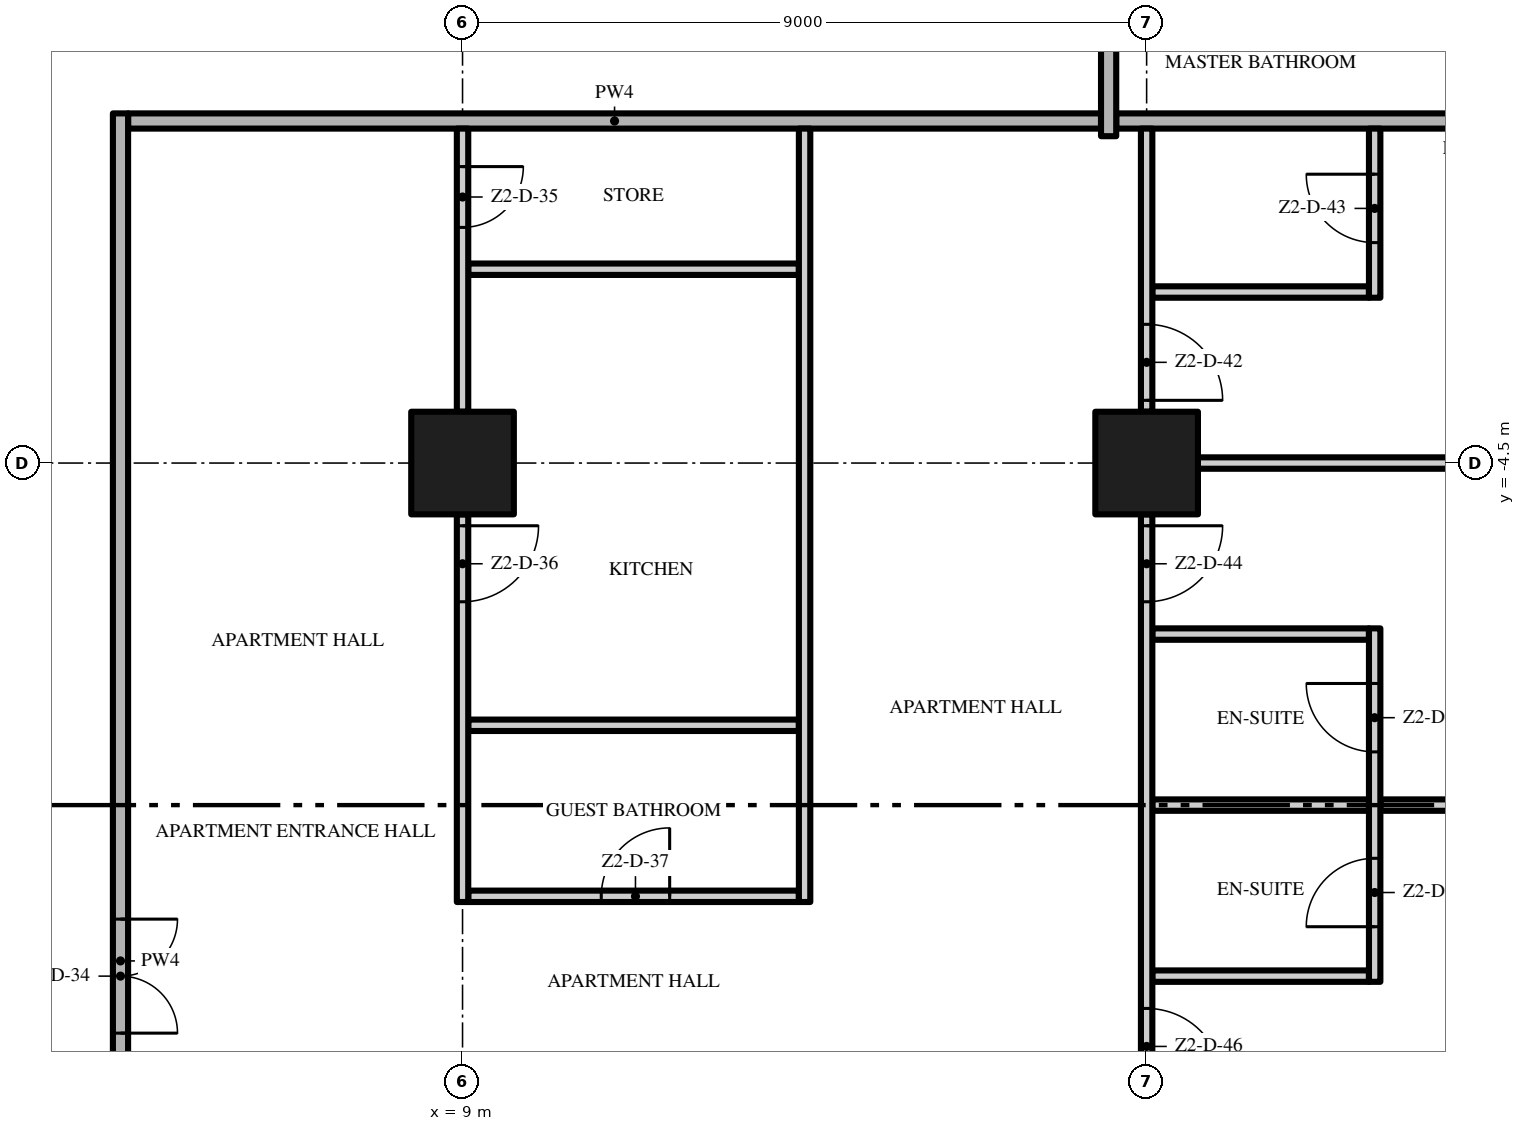
"""IFC4 building model, lengths in metres.
Left out: names, types, materials, properties, quantities, classifications, styles, units other than length and angle.
Written with IfcOpenShell. Run it as: python <this file> out.ifc"""

import sys

from ifc_helpers import new_model, si_unit, direction, frame, frame_2d, origin, origin_2d, place, context, subcontext, project, spatial, rectangle, extrude, element, fill, save


model = new_model("IFC4")
c1 = context("Model", 3, precision=1e-05, world=origin(), true_north=direction((0.0, 1.0)))
c2 = subcontext(c1, "Body", "Model", "MODEL_VIEW")
j1 = project(units=[si_unit("LENGTHUNIT", "METRE"), si_unit("PLANEANGLEUNIT", "RADIAN")], contexts=[c1])
p1 = place(None, origin())
s1 = spatial("IfcSite", under=j1, at=p1, CompositionType="ELEMENT")
p2 = place(p1, origin())
s2 = spatial("IfcBuilding", under=s1, at=p2, CompositionType="ELEMENT")
p3 = place(p2, frame((0.0, 0.0, 111.2)))
s3 = spatial("IfcBuildingStorey", under=s2, at=p3, CompositionType="ELEMENT", Elevation=111.2)
for number, where, z_axis, x_axis in (
    (1, (18.0, -4.5, 0.0), (0.0, 0.0, 1.0), (1.0, 0.0, 0.0)),
    (2, (9.0, -4.5, 0.0), (0.0, 0.0, 1.0), (1.0, 0.0, 0.0)),
):
    element("IfcColumn", number, at=place(p3, frame(where, z_axis=z_axis, x_axis=x_axis)), inside=s3, PredefinedType="COLUMN", context=c2, shape_type="SweptSolid", body=[
        extrude(rectangle(XDim=1.35, YDim=1.35, at=origin_2d()), origin(), (0.0, 0.0, 1.0), 3.5),
    ])
p4 = place(p3, frame((18.075, -11.25, 0.0), z_axis=(0.0, 0.0, 1.0), x_axis=(1.0, 0.0, 0.0)))
e3 = element("IfcWall", 3, at=p4, inside=s3, PredefinedType="PARTITIONING", context=c2, shape_type="SweptSolid", body=[
    extrude(rectangle(XDim=2.85, YDim=0.15, at=frame_2d((1.425, 0.0))), origin(), (0.0, 0.0, 1.0), 3.5),
])
p5 = place(p3, frame((9.075, -10.2, 0.0), z_axis=(0.0, 0.0, 1.0), x_axis=(1.0, 0.0, 0.0)))
e4 = element("IfcWall", 4, at=p5, inside=s3, PredefinedType="PARTITIONING", context=c2, shape_type="SweptSolid", body=[
    extrude(rectangle(XDim=4.35, YDim=0.15, at=frame_2d((2.175, 0.0))), origin(), (0.0, 0.0, 1.0), 3.5),
])
p6 = place(p5, frame((1.75, 0.0, 0.0)))
e5 = element("IfcOpeningElement", 5, at=p6, cuts=e4, PredefinedType="OPENING", context=c2, shape_type="SweptSolid", body=[
    extrude(rectangle(XDim=0.9, YDim=2.1, at=frame_2d((0.45, 1.05))), frame((0.0, 0.085, 0.0), z_axis=(0.0, -1.0, 0.0), x_axis=(1.0, 0.0, 0.0)), (0.0, 0.0, 1.0), 0.17),
])
p7 = place(p3, frame((18.075, -9.0, 0.0), z_axis=(0.0, 0.0, 1.0), x_axis=(1.0, 0.0, 0.0)))
e6 = element("IfcWall", 6, at=p7, inside=s3, PredefinedType="PARTITIONING", context=c2, shape_type="SweptSolid", body=[
    extrude(rectangle(XDim=2.85, YDim=0.15, at=frame_2d((1.425, 0.0))), origin(), (0.0, 0.0, 1.0), 3.5),
])
p8 = place(p3, frame((21.075, -9.0, 0.0), z_axis=(0.0, 0.0, 1.0), x_axis=(1.0, 0.0, 0.0)))
e7 = element("IfcWall", 7, at=p8, inside=s3, PredefinedType="PARTITIONING", context=c2, shape_type="SweptSolid", body=[
    extrude(rectangle(XDim=5.625, YDim=0.15, at=frame_2d((2.812, 0.0))), origin(), (0.0, 0.0, 1.0), 3.5),
])
p9 = place(p3, frame((9.075, -7.95, 0.0), z_axis=(0.0, 0.0, 1.0), x_axis=(1.0, 0.0, 0.0)))
e8 = element("IfcWall", 8, at=p9, inside=s3, PredefinedType="PARTITIONING", context=c2, shape_type="SweptSolid", body=[
    extrude(rectangle(XDim=4.35, YDim=0.15, at=frame_2d((2.175, 0.0))), origin(), (0.0, 0.0, 1.0), 3.5),
])
p10 = place(p3, frame((18.075, -6.75, 0.0), z_axis=(0.0, 0.0, 1.0), x_axis=(1.0, 0.0, 0.0)))
e9 = element("IfcWall", 9, at=p10, inside=s3, PredefinedType="PARTITIONING", context=c2, shape_type="SweptSolid", body=[
    extrude(rectangle(XDim=2.85, YDim=0.15, at=frame_2d((1.425, 0.0))), origin(), (0.0, 0.0, 1.0), 3.5),
])
p11 = place(p3, frame((18.675, -4.5, 0.0), z_axis=(0.0, 0.0, 1.0), x_axis=(1.0, 0.0, 0.0)))
e10 = element("IfcWall", 10, at=p11, inside=s3, PredefinedType="PARTITIONING", context=c2, shape_type="SweptSolid", body=[
    extrude(rectangle(XDim=7.075, YDim=0.15, at=frame_2d((3.538, 0.0))), origin(), (0.0, 0.0, 1.0), 3.5),
])
p12 = place(p3, frame((18.075, -2.25, 0.0), z_axis=(0.0, 0.0, 1.0), x_axis=(1.0, 0.0, 0.0)))
e11 = element("IfcWall", 11, at=p12, inside=s3, PredefinedType="PARTITIONING", context=c2, shape_type="SweptSolid", body=[
    extrude(rectangle(XDim=2.85, YDim=0.15, at=frame_2d((1.425, 0.0))), origin(), (0.0, 0.0, 1.0), 3.5),
])
p13 = place(p3, frame((9.075, -1.95, 0.0), z_axis=(0.0, 0.0, 1.0), x_axis=(1.0, 0.0, 0.0)))
e12 = element("IfcWall", 12, at=p13, inside=s3, PredefinedType="PARTITIONING", context=c2, shape_type="SweptSolid", body=[
    extrude(rectangle(XDim=4.35, YDim=0.15, at=frame_2d((2.175, 0.0))), origin(), (0.0, 0.0, 1.0), 3.5),
])
p14 = place(p3, frame((4.6, 0.0, 0.0), z_axis=(0.0, 0.0, 1.0), x_axis=(1.0, 0.0, 0.0)))
e13 = element("IfcWall", 13, at=p14, inside=s3, PredefinedType="PARTITIONING", context=c2, shape_type="SweptSolid", body=[
    extrude(rectangle(XDim=12.8, YDim=0.2, at=frame_2d((6.4, 0.0))), origin(), (0.0, 0.0, 1.0), 3.5),
])
p15 = place(p3, frame((17.6, 0.0, 0.0), z_axis=(0.0, 0.0, 1.0), x_axis=(1.0, 0.0, 0.0)))
e14 = element("IfcWall", 14, at=p15, inside=s3, PredefinedType="PARTITIONING", context=c2, shape_type="SweptSolid", body=[
    extrude(rectangle(XDim=9.1, YDim=0.2, at=frame_2d((4.55, 0.0))), origin(), (0.0, 0.0, 1.0), 3.5),
])
p16 = place(p3, frame((4.5, 0.1, 0.0), z_axis=(0.0, 0.0, 1.0), x_axis=(0.0, -1.0, 0.0)))
e15 = element("IfcWall", 15, at=p16, inside=s3, PredefinedType="PARTITIONING", context=c2, shape_type="SweptSolid", body=[
    extrude(rectangle(XDim=22.3, YDim=0.2, at=frame_2d((11.15, 0.0))), origin(), (0.0, 0.0, 1.0), 3.5),
])
p17 = place(p16, frame((10.6, 0.0, 0.0)))
e16 = element("IfcOpeningElement", 16, at=p17, cuts=e15, PredefinedType="OPENING", context=c2, shape_type="SweptSolid", body=[
    extrude(rectangle(XDim=1.5, YDim=2.4, at=frame_2d((0.75, 1.2))), frame((0.0, 0.11, 0.0), z_axis=(0.0, -1.0, 0.0), x_axis=(1.0, 0.0, 0.0)), (0.0, 0.0, 1.0), 0.22),
])
p18 = place(p3, frame((9.0, -5.175, 0.0), z_axis=(0.0, 0.0, 1.0), x_axis=(0.0, -1.0, 0.0)))
e17 = element("IfcWall", 17, at=p18, inside=s3, PredefinedType="PARTITIONING", context=c2, shape_type="SweptSolid", body=[
    extrude(rectangle(XDim=5.1, YDim=0.15, at=frame_2d((2.55, 0.0))), origin(), (0.0, 0.0, 1.0), 3.5),
])
p19 = place(p18, frame((0.15, 0.0, 0.0)))
e18 = element("IfcOpeningElement", 18, at=p19, cuts=e17, PredefinedType="OPENING", context=c2, shape_type="SweptSolid", body=[
    extrude(rectangle(XDim=1.0, YDim=2.4, at=frame_2d((0.5, 1.2))), frame((0.0, 0.085, 0.0), z_axis=(0.0, -1.0, 0.0), x_axis=(1.0, 0.0, 0.0)), (0.0, 0.0, 1.0), 0.17),
])
p20 = place(p3, frame((9.0, -0.1, 0.0), z_axis=(0.0, 0.0, 1.0), x_axis=(0.0, -1.0, 0.0)))
e19 = element("IfcWall", 19, at=p20, inside=s3, PredefinedType="PARTITIONING", context=c2, shape_type="SweptSolid", body=[
    extrude(rectangle(XDim=3.725, YDim=0.15, at=frame_2d((1.863, 0.0))), origin(), (0.0, 0.0, 1.0), 3.5),
])
p21 = place(p20, frame((0.5, 0.0, 0.0)))
e20 = element("IfcOpeningElement", 20, at=p21, cuts=e19, PredefinedType="OPENING", context=c2, shape_type="SweptSolid", body=[
    extrude(rectangle(XDim=0.8, YDim=2.0, at=frame_2d((0.4, 1.0))), frame((0.0, 0.085, 0.0), z_axis=(0.0, -1.0, 0.0), x_axis=(1.0, 0.0, 0.0)), (0.0, 0.0, 1.0), 0.17),
])
p22 = place(p3, frame((13.5, -10.275, 0.0), z_axis=(0.0, 0.0, 1.0), x_axis=(0.0, 1.0, 0.0)))
e21 = element("IfcWall", 21, at=p22, inside=s3, PredefinedType="PARTITIONING", context=c2, shape_type="SweptSolid", body=[
    extrude(rectangle(XDim=10.175, YDim=0.15, at=frame_2d((5.088, 0.0))), origin(), (0.0, 0.0, 1.0), 3.5),
])
p23 = place(p3, frame((17.5, -0.2, 0.0), z_axis=(0.0, 0.0, 1.0), x_axis=(0.0, 1.0, 0.0)))
e22 = element("IfcWall", 22, at=p23, inside=s3, PredefinedType="PARTITIONING", context=c2, shape_type="SweptSolid", body=[
    extrude(rectangle(XDim=4.025, YDim=0.2, at=frame_2d((2.013, 0.0))), origin(), (0.0, 0.0, 1.0), 3.5),
])
p24 = place(p3, frame((18.0, -5.175, 0.0), z_axis=(0.0, 0.0, 1.0), x_axis=(0.0, -1.0, 0.0)))
e23 = element("IfcWall", 23, at=p24, inside=s3, PredefinedType="PARTITIONING", context=c2, shape_type="SweptSolid", body=[
    extrude(rectangle(XDim=7.65, YDim=0.15, at=frame_2d((3.825, 0.0))), origin(), (0.0, 0.0, 1.0), 3.5),
])
p25 = place(p24, frame((0.15, 0.0, 0.0)))
e24 = element("IfcOpeningElement", 24, at=p25, cuts=e23, PredefinedType="OPENING", context=c2, shape_type="SweptSolid", body=[
    extrude(rectangle(XDim=1.0, YDim=2.4, at=frame_2d((0.5, 1.2))), frame((0.0, 0.085, 0.0), z_axis=(0.0, -1.0, 0.0), x_axis=(1.0, 0.0, 0.0)), (0.0, 0.0, 1.0), 0.17),
])
p26 = place(p24, frame((6.5, 0.0, 0.0)))
e25 = element("IfcOpeningElement", 25, at=p26, cuts=e23, PredefinedType="OPENING", context=c2, shape_type="SweptSolid", body=[
    extrude(rectangle(XDim=1.0, YDim=2.4, at=frame_2d((0.5, 1.2))), frame((0.0, 0.085, 0.0), z_axis=(0.0, -1.0, 0.0), x_axis=(1.0, 0.0, 0.0)), (0.0, 0.0, 1.0), 0.17),
])
p27 = place(p3, frame((18.0, -0.1, 0.0), z_axis=(0.0, 0.0, 1.0), x_axis=(0.0, -1.0, 0.0)))
e26 = element("IfcWall", 26, at=p27, inside=s3, PredefinedType="PARTITIONING", context=c2, shape_type="SweptSolid", body=[
    extrude(rectangle(XDim=3.725, YDim=0.15, at=frame_2d((1.863, 0.0))), origin(), (0.0, 0.0, 1.0), 3.5),
])
p28 = place(p27, frame((2.575, 0.0, 0.0)))
e27 = element("IfcOpeningElement", 27, at=p28, cuts=e26, PredefinedType="OPENING", context=c2, shape_type="SweptSolid", body=[
    extrude(rectangle(XDim=1.0, YDim=2.4, at=frame_2d((0.5, 1.2))), frame((0.0, 0.085, 0.0), z_axis=(0.0, -1.0, 0.0), x_axis=(1.0, 0.0, 0.0)), (0.0, 0.0, 1.0), 0.17),
])
p29 = place(p3, frame((21.0, -11.325, 0.0), z_axis=(0.0, 0.0, 1.0), x_axis=(0.0, 1.0, 0.0)))
e28 = element("IfcWall", 28, at=p29, inside=s3, PredefinedType="PARTITIONING", context=c2, shape_type="SweptSolid", body=[
    extrude(rectangle(XDim=4.65, YDim=0.15, at=frame_2d((2.325, 0.0))), origin(), (0.0, 0.0, 1.0), 3.5),
])
p30 = place(p29, frame((3.025, 0.0, 0.0)))
e29 = element("IfcOpeningElement", 29, at=p30, cuts=e28, PredefinedType="OPENING", context=c2, shape_type="SweptSolid", body=[
    extrude(rectangle(XDim=0.9, YDim=2.1, at=frame_2d((0.45, 1.05))), frame((0.0, 0.085, 0.0), z_axis=(0.0, -1.0, 0.0), x_axis=(1.0, 0.0, 0.0)), (0.0, 0.0, 1.0), 0.17),
])
p31 = place(p29, frame((0.725, 0.0, 0.0)))
e30 = element("IfcOpeningElement", 30, at=p31, cuts=e28, PredefinedType="OPENING", context=c2, shape_type="SweptSolid", body=[
    extrude(rectangle(XDim=0.9, YDim=2.1, at=frame_2d((0.45, 1.05))), frame((0.0, 0.085, 0.0), z_axis=(0.0, -1.0, 0.0), x_axis=(1.0, 0.0, 0.0)), (0.0, 0.0, 1.0), 0.17),
])
p32 = place(p3, frame((21.0, -2.325, 0.0), z_axis=(0.0, 0.0, 1.0), x_axis=(0.0, 1.0, 0.0)))
e31 = element("IfcWall", 31, at=p32, inside=s3, PredefinedType="PARTITIONING", context=c2, shape_type="SweptSolid", body=[
    extrude(rectangle(XDim=2.225, YDim=0.15, at=frame_2d((1.113, 0.0))), origin(), (0.0, 0.0, 1.0), 3.5),
])
p33 = place(p32, frame((0.725, 0.0, 0.0)))
e32 = element("IfcOpeningElement", 32, at=p33, cuts=e31, PredefinedType="OPENING", context=c2, shape_type="SweptSolid", body=[
    extrude(rectangle(XDim=0.9, YDim=2.1, at=frame_2d((0.45, 1.05))), frame((0.0, 0.085, 0.0), z_axis=(0.0, -1.0, 0.0), x_axis=(1.0, 0.0, 0.0)), (0.0, 0.0, 1.0), 0.17),
])
p34 = place(p17, origin())
e33 = element("IfcDoor", 33, at=p34, inside=s3, OperationType="DOUBLE_DOOR_SINGLE_SWING", PredefinedType="DOOR", context=c2, shape_type="SweptSolid", body=[
    extrude(rectangle(XDim=1.5, YDim=2.4, at=frame_2d((0.75, 1.2))), frame((0.0, 0.025, 0.0), z_axis=(0.0, -1.0, 0.0), x_axis=(1.0, 0.0, 0.0)), (0.0, 0.0, 1.0), 0.05),
])
fill(e16, e33)
p35 = place(p21, origin())
e34 = element("IfcDoor", 34, at=p35, inside=s3, OperationType="SINGLE_SWING_LEFT", PredefinedType="DOOR", context=c2, shape_type="SweptSolid", body=[
    extrude(rectangle(XDim=0.8, YDim=2.0, at=frame_2d((0.4, 1.0))), frame((0.0, 0.025, 0.0), z_axis=(0.0, -1.0, 0.0), x_axis=(1.0, 0.0, 0.0)), (0.0, 0.0, 1.0), 0.05),
])
fill(e20, e34)
p36 = place(p19, origin())
e35 = element("IfcDoor", 35, at=p36, inside=s3, OperationType="SINGLE_SWING_LEFT", PredefinedType="DOOR", context=c2, shape_type="SweptSolid", body=[
    extrude(rectangle(XDim=1.0, YDim=2.4, at=frame_2d((0.5, 1.2))), frame((0.0, 0.025, 0.0), z_axis=(0.0, -1.0, 0.0), x_axis=(1.0, 0.0, 0.0)), (0.0, 0.0, 1.0), 0.05),
])
fill(e18, e35)
p37 = place(p6, origin())
e36 = element("IfcDoor", 36, at=p37, inside=s3, OperationType="SINGLE_SWING_RIGHT", PredefinedType="DOOR", context=c2, shape_type="SweptSolid", body=[
    extrude(rectangle(XDim=0.9, YDim=2.1, at=frame_2d((0.45, 1.05))), frame((0.0, 0.025, 0.0), z_axis=(0.0, -1.0, 0.0), x_axis=(1.0, 0.0, 0.0)), (0.0, 0.0, 1.0), 0.05),
])
fill(e5, e36)
p38 = place(p28, origin())
e37 = element("IfcDoor", 37, at=p38, inside=s3, OperationType="SINGLE_SWING_RIGHT", PredefinedType="DOOR", context=c2, shape_type="SweptSolid", body=[
    extrude(rectangle(XDim=1.0, YDim=2.4, at=frame_2d((0.5, 1.2))), frame((0.0, 0.025, 0.0), z_axis=(0.0, -1.0, 0.0), x_axis=(1.0, 0.0, 0.0)), (0.0, 0.0, 1.0), 0.05),
])
fill(e27, e37)
p39 = place(p33, origin())
e38 = element("IfcDoor", 38, at=p39, inside=s3, OperationType="SINGLE_SWING_RIGHT", PredefinedType="DOOR", context=c2, shape_type="SweptSolid", body=[
    extrude(rectangle(XDim=0.9, YDim=2.1, at=frame_2d((0.45, 1.05))), frame((0.0, 0.025, 0.0), z_axis=(0.0, -1.0, 0.0), x_axis=(1.0, 0.0, 0.0)), (0.0, 0.0, 1.0), 0.05),
])
fill(e32, e38)
p40 = place(p25, origin())
e39 = element("IfcDoor", 39, at=p40, inside=s3, OperationType="SINGLE_SWING_LEFT", PredefinedType="DOOR", context=c2, shape_type="SweptSolid", body=[
    extrude(rectangle(XDim=1.0, YDim=2.4, at=frame_2d((0.5, 1.2))), frame((0.0, 0.025, 0.0), z_axis=(0.0, -1.0, 0.0), x_axis=(1.0, 0.0, 0.0)), (0.0, 0.0, 1.0), 0.05),
])
fill(e24, e39)
p41 = place(p30, origin())
e40 = element("IfcDoor", 40, at=p41, inside=s3, OperationType="SINGLE_SWING_RIGHT", PredefinedType="DOOR", context=c2, shape_type="SweptSolid", body=[
    extrude(rectangle(XDim=0.9, YDim=2.1, at=frame_2d((0.45, 1.05))), frame((0.0, 0.025, 0.0), z_axis=(0.0, -1.0, 0.0), x_axis=(1.0, 0.0, 0.0)), (0.0, 0.0, 1.0), 0.05),
])
fill(e29, e40)
p42 = place(p26, origin())
e41 = element("IfcDoor", 41, at=p42, inside=s3, OperationType="SINGLE_SWING_RIGHT", PredefinedType="DOOR", context=c2, shape_type="SweptSolid", body=[
    extrude(rectangle(XDim=1.0, YDim=2.4, at=frame_2d((0.5, 1.2))), frame((0.0, 0.025, 0.0), z_axis=(0.0, -1.0, 0.0), x_axis=(1.0, 0.0, 0.0)), (0.0, 0.0, 1.0), 0.05),
])
fill(e25, e41)
p43 = place(p31, origin())
e42 = element("IfcDoor", 42, at=p43, inside=s3, OperationType="SINGLE_SWING_LEFT", PredefinedType="DOOR", context=c2, shape_type="SweptSolid", body=[
    extrude(rectangle(XDim=0.9, YDim=2.1, at=frame_2d((0.45, 1.05))), frame((0.0, 0.025, 0.0), z_axis=(0.0, -1.0, 0.0), x_axis=(1.0, 0.0, 0.0)), (0.0, 0.0, 1.0), 0.05),
])
fill(e30, e42)
save(model, sys.argv[1])
